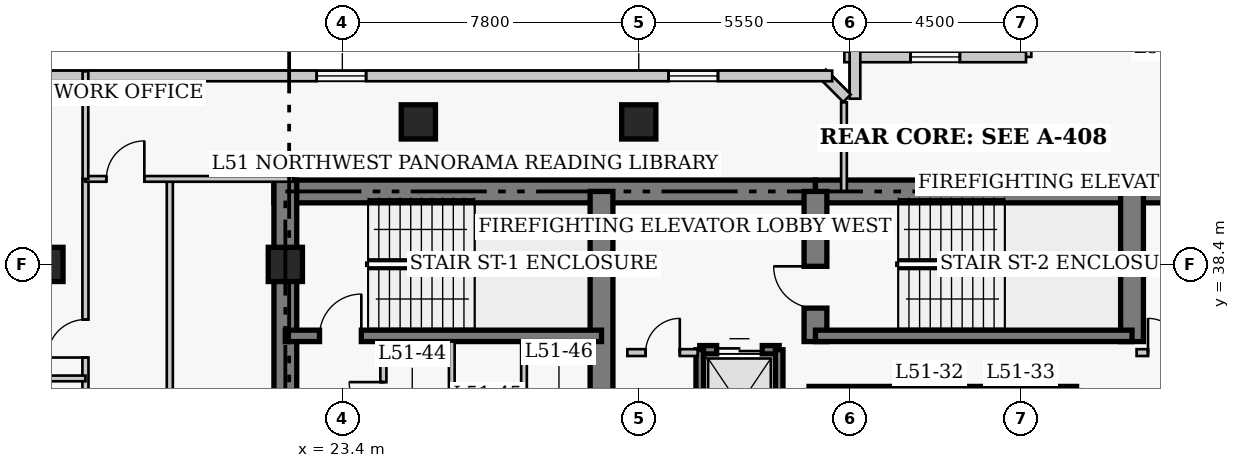
"""IFC4 building model, lengths in metres.
Left out: names, types, materials, properties, quantities, classifications, styles, units other than length and angle.
Written with IfcOpenShell. Run it as: python <this file> out.ifc"""

import sys

from ifc_helpers import new_model, si_unit, direction, frame, frame_2d, origin, origin_2d, place, context, subcontext, project, spatial, rectangle, extrude, element, fill, save


model = new_model("IFC4")
c1 = context("Model", 3, precision=1e-05, world=origin(), true_north=direction((0.0, 1.0)))
c2 = subcontext(c1, "Body", "Model", "MODEL_VIEW")
j1 = project(units=[si_unit("LENGTHUNIT", "METRE"), si_unit("PLANEANGLEUNIT", "RADIAN")], contexts=[c1])
p1 = place(None, origin())
s1 = spatial("IfcSite", under=j1, at=p1, CompositionType="ELEMENT")
p2 = place(p1, origin())
s2 = spatial("IfcBuilding", under=s1, at=p2, CompositionType="ELEMENT")
p3 = place(p2, frame((0.0, 0.0, 204.6)))
s3 = spatial("IfcBuildingStorey", under=s2, at=p3, CompositionType="ELEMENT", Elevation=204.6)
p4 = place(p3, frame((21.6, 40.32, 0.0), z_axis=(0.0, 0.0, 1.0), x_axis=(1.0, 0.0, 0.0)))
e1 = element("IfcWall", 1, at=p4, inside=s3, PredefinedType="SHEAR", context=c2, shape_type="SweptSolid", body=[
    extrude(rectangle(XDim=14.25, YDim=0.6, at=frame_2d((7.125, 0.0))), origin(), (0.0, 0.0, 1.0), 3.9),
])
p5 = place(p3, frame((35.85, 40.32, 0.0), z_axis=(0.0, 0.0, 1.0), x_axis=(1.0, 0.0, 0.0)))
e2 = element("IfcWall", 2, at=p5, inside=s3, PredefinedType="SHEAR", context=c2, shape_type="SweptSolid", body=[
    extrude(rectangle(XDim=12.6, YDim=0.6, at=frame_2d((6.3, 0.0))), origin(), (0.0, 0.0, 1.0), 3.9),
])
p6 = place(p3, frame((21.9, 27.05, 0.0), z_axis=(0.0, 0.0, 1.0), x_axis=(0.0, 1.0, 0.0)))
e3 = element("IfcWall", 3, at=p6, inside=s3, PredefinedType="SHEAR", context=c2, shape_type="SweptSolid", body=[
    extrude(rectangle(XDim=13.57, YDim=0.6, at=frame_2d((6.785, 0.0))), origin(), (0.0, 0.0, 1.0), 3.9),
])
p7 = place(p3, frame((30.22, 33.05, 0.0), z_axis=(0.0, 0.0, 1.0), x_axis=(0.0, 1.0, 0.0)))
e4 = element("IfcWall", 4, at=p7, inside=s3, PredefinedType="SHEAR", context=c2, shape_type="SweptSolid", body=[
    extrude(rectangle(XDim=7.27, YDim=0.6, at=frame_2d((3.635, 0.0))), origin(), (0.0, 0.0, 1.0), 3.9),
])
p8 = place(p3, frame((35.85, 36.37, 0.0), z_axis=(0.0, 0.0, 1.0), x_axis=(0.0, 1.0, 0.0)))
e5 = element("IfcWall", 5, at=p8, inside=s3, PredefinedType="SHEAR", context=c2, shape_type="SweptSolid", body=[
    extrude(rectangle(XDim=3.95, YDim=0.6, at=frame_2d((1.975, 0.0))), origin(), (0.0, 0.0, 1.0), 3.9),
])
p9 = place(p8, frame((0.88, 0.0, 0.0)))
e6 = element("IfcOpeningElement", 6, at=p9, cuts=e5, PredefinedType="OPENING", context=c2, shape_type="SweptSolid", body=[
    extrude(rectangle(XDim=1.1, YDim=2.15, at=frame_2d((0.55, 1.075))), frame((0.0, 0.31, 0.0), z_axis=(0.0, -1.0, 0.0), x_axis=(1.0, 0.0, 0.0)), (0.0, 0.0, 1.0), 0.62),
])
p10 = place(p3, frame((44.18, 36.37, 0.0), z_axis=(0.0, 0.0, 1.0), x_axis=(0.0, 1.0, 0.0)))
e7 = element("IfcWall", 7, at=p10, inside=s3, PredefinedType="SHEAR", context=c2, shape_type="SweptSolid", body=[
    extrude(rectangle(XDim=3.95, YDim=0.6, at=frame_2d((1.975, 0.0))), origin(), (0.0, 0.0, 1.0), 3.9),
])
p11 = place(p3, frame((21.9, 36.52, 0.0), z_axis=(0.0, 0.0, 1.0), x_axis=(1.0, 0.0, 0.0)))
e8 = element("IfcWall", 8, at=p11, inside=s3, PredefinedType="SHEAR", context=c2, shape_type="SweptSolid", body=[
    extrude(rectangle(XDim=8.32, YDim=0.3, at=frame_2d((4.16, 0.0))), origin(), (0.0, 0.0, 1.0), 3.9),
])
p12 = place(p11, frame((0.9, 0.0, 0.0)))
e9 = element("IfcOpeningElement", 9, at=p12, cuts=e8, PredefinedType="OPENING", context=c2, shape_type="SweptSolid", body=[
    extrude(rectangle(XDim=1.1, YDim=2.15, at=frame_2d((0.55, 1.075))), frame((0.0, 0.16, 0.0), z_axis=(0.0, -1.0, 0.0), x_axis=(1.0, 0.0, 0.0)), (0.0, 0.0, 1.0), 0.32),
])
p13 = place(p3, frame((35.85, 36.52, 0.0), z_axis=(0.0, 0.0, 1.0), x_axis=(1.0, 0.0, 0.0)))
e10 = element("IfcWall", 10, at=p13, inside=s3, PredefinedType="SHEAR", context=c2, shape_type="SweptSolid", body=[
    extrude(rectangle(XDim=8.33, YDim=0.3, at=frame_2d((4.165, 0.0))), origin(), (0.0, 0.0, 1.0), 3.9),
])
for number, where, z_axis, x_axis in (
    (11, (15.6, 38.4, 0.0), (0.0, 0.0, 1.0), (1.0, 0.0, 0.0)),
    (12, (21.9, 38.4, 0.0), (0.0, 0.0, 1.0), (1.0, 0.0, 0.0)),
    (13, (25.4, 42.15, 0.0), (0.0, 0.0, 1.0), (1.0, 0.0, 0.0)),
    (14, (31.2, 42.15, 0.0), (0.0, 0.0, 1.0), (1.0, 0.0, 0.0)),
):
    element("IfcColumn", number, at=place(p3, frame(where, z_axis=z_axis, x_axis=x_axis)), inside=s3, PredefinedType="COLUMN", context=c2, shape_type="SweptSolid", body=[
        extrude(rectangle(XDim=0.9, YDim=0.9, at=origin_2d()), origin(), (0.0, 0.0, 1.0), 3.9),
    ])
p14 = place(p3, frame((41.39, 47.44, 0.0), z_axis=(0.0, 0.0, 1.0), x_axis=(0.0, -1.0, 0.0)))
e15 = element("IfcWall", 15, at=p14, inside=s3, PredefinedType="SOLIDWALL", context=c2, shape_type="SweptSolid", body=[
    extrude(rectangle(XDim=3.58, YDim=0.28, at=frame_2d((1.79, 0.0))), origin(), (0.0, 0.0, 1.0), 3.65),
])
p15 = place(p14, frame((1.14, 0.0, 0.85)))
e16 = element("IfcOpeningElement", 16, at=p15, cuts=e15, PredefinedType="OPENING", context=c2, shape_type="SweptSolid", body=[
    extrude(rectangle(XDim=1.3, YDim=1.7, at=frame_2d((0.65, 0.85))), frame((0.0, 0.15, 0.0), z_axis=(0.0, -1.0, 0.0), x_axis=(1.0, 0.0, 0.0)), (0.0, 0.0, 1.0), 0.3),
])
p16 = place(p3, frame((41.39, 43.86, 0.0), z_axis=(0.0, 0.0, 1.0), x_axis=(-1.0, 0.0, 0.0)))
e17 = element("IfcWall", 17, at=p16, inside=s3, PredefinedType="SOLIDWALL", context=c2, shape_type="SweptSolid", body=[
    extrude(rectangle(XDim=4.78, YDim=0.28, at=frame_2d((2.39, 0.0))), origin(), (0.0, 0.0, 1.0), 3.65),
])
p17 = place(p16, frame((1.74, 0.0, 0.85)))
e18 = element("IfcOpeningElement", 18, at=p17, cuts=e17, PredefinedType="OPENING", context=c2, shape_type="SweptSolid", body=[
    extrude(rectangle(XDim=1.3, YDim=1.7, at=frame_2d((0.65, 0.85))), frame((0.0, 0.15, 0.0), z_axis=(0.0, -1.0, 0.0), x_axis=(1.0, 0.0, 0.0)), (0.0, 0.0, 1.0), 0.3),
])
p18 = place(p3, frame((36.89, 44.14, 0.0), z_axis=(0.0, 0.0, 1.0), x_axis=(0.0, -1.0, 0.0)))
e19 = element("IfcWall", 19, at=p18, inside=s3, PredefinedType="SOLIDWALL", context=c2, shape_type="SweptSolid", body=[
    extrude(rectangle(XDim=1.38, YDim=0.28, at=frame_2d((0.69, 0.0))), origin(), (0.0, 0.0, 1.0), 3.65),
])
p19 = place(p3, frame((36.679, 42.773, 0.0), z_axis=(0.0, 0.0, 1.0), x_axis=(-0.707106781187, 0.707106781187, 0.0)))
e20 = element("IfcWall", 20, at=p19, inside=s3, PredefinedType="SOLIDWALL", context=c2, shape_type="SweptSolid", body=[
    extrude(rectangle(XDim=0.928, YDim=0.28, at=frame_2d((0.464, 0.0))), origin(), (0.0, 0.0, 1.0), 3.65),
])
p20 = place(p3, frame((36.29, 43.36, 0.0), z_axis=(0.0, 0.0, 1.0), x_axis=(-1.0, 0.0, 0.0)))
e21 = element("IfcWall", 21, at=p20, inside=s3, PredefinedType="SOLIDWALL", context=c2, shape_type="SweptSolid", body=[
    extrude(rectangle(XDim=25.83, YDim=0.28, at=frame_2d((12.915, 0.0))), origin(), (0.0, 0.0, 1.0), 3.65),
])
p21 = place(p20, frame((3.005, 0.0, 0.85)))
e22 = element("IfcOpeningElement", 22, at=p21, cuts=e21, PredefinedType="OPENING", context=c2, shape_type="SweptSolid", body=[
    extrude(rectangle(XDim=1.3, YDim=1.7, at=frame_2d((0.65, 0.85))), frame((0.0, 0.15, 0.0), z_axis=(0.0, -1.0, 0.0), x_axis=(1.0, 0.0, 0.0)), (0.0, 0.0, 1.0), 0.3),
])
p22 = place(p20, frame((12.265, 0.0, 0.85)))
e23 = element("IfcOpeningElement", 23, at=p22, cuts=e21, PredefinedType="OPENING", context=c2, shape_type="SweptSolid", body=[
    extrude(rectangle(XDim=1.3, YDim=1.7, at=frame_2d((0.65, 0.85))), frame((0.0, 0.15, 0.0), z_axis=(0.0, -1.0, 0.0), x_axis=(1.0, 0.0, 0.0)), (0.0, 0.0, 1.0), 0.3),
])
p23 = place(p20, frame((20.875, 0.0, 0.85)))
e24 = element("IfcOpeningElement", 24, at=p23, cuts=e21, PredefinedType="OPENING", context=c2, shape_type="SweptSolid", body=[
    extrude(rectangle(XDim=1.3, YDim=1.7, at=frame_2d((0.65, 0.85))), frame((0.0, 0.15, 0.0), z_axis=(0.0, -1.0, 0.0), x_axis=(1.0, 0.0, 0.0)), (0.0, 0.0, 1.0), 0.3),
])
p24 = place(p3, frame((35.68, 35.08, 0.0), z_axis=(0.0, 0.0, 1.0), x_axis=(1.0, 0.0, 0.0)))
e25 = element("IfcWall", 25, at=p24, inside=s3, PredefinedType="SHEAR", context=c2, shape_type="SweptSolid", body=[
    extrude(rectangle(XDim=2.32, YDim=0.22, at=frame_2d((1.16, 0.0))), origin(), (0.0, 0.0, 1.0), 3.9),
])
p25 = place(p3, frame((38.0, 35.08, 0.0), z_axis=(0.0, 0.0, 1.0), x_axis=(1.0, 0.0, 0.0)))
e26 = element("IfcWall", 26, at=p25, inside=s3, PredefinedType="SHEAR", context=c2, shape_type="SweptSolid", body=[
    extrude(rectangle(XDim=2.4, YDim=0.22, at=frame_2d((1.2, 0.0))), origin(), (0.0, 0.0, 1.0), 3.9),
])
p26 = place(p3, frame((40.4, 35.08, 0.0), z_axis=(0.0, 0.0, 1.0), x_axis=(1.0, 0.0, 0.0)))
e27 = element("IfcWall", 27, at=p26, inside=s3, PredefinedType="SHEAR", context=c2, shape_type="SweptSolid", body=[
    extrude(rectangle(XDim=2.32, YDim=0.22, at=frame_2d((1.16, 0.0))), origin(), (0.0, 0.0, 1.0), 3.9),
])
p27 = place(p3, frame((32.805, 36.155, 0.0), z_axis=(0.0, 0.0, 1.0), x_axis=(1.0, 0.0, 0.0)))
e28 = element("IfcWall", 28, at=p27, inside=s3, PredefinedType="SHEAR", context=c2, shape_type="SweptSolid", body=[
    extrude(rectangle(XDim=2.09, YDim=0.22, at=frame_2d((1.045, 0.0))), origin(), (0.0, 0.0, 1.0), 3.9),
])
p28 = place(p27, frame((0.445, 0.0, 0.0)))
e29 = element("IfcOpeningElement", 29, at=p28, cuts=e28, PredefinedType="OPENING", context=c2, shape_type="SweptSolid", body=[
    extrude(rectangle(XDim=1.2, YDim=2.15, at=frame_2d((0.6, 1.075))), frame((0.0, 0.12, 0.0), z_axis=(0.0, -1.0, 0.0), x_axis=(1.0, 0.0, 0.0)), (0.0, 0.0, 1.0), 0.24),
])
for number, where, z_axis, x_axis in (
    (30, (32.805, 33.245, 0.0), (0.0, 0.0, 1.0), (0.0, 1.0, 0.0)),
    (31, (34.895, 33.245, 0.0), (0.0, 0.0, 1.0), (0.0, 1.0, 0.0)),
):
    element("IfcWall", number, at=place(p3, frame(where, z_axis=z_axis, x_axis=x_axis)), inside=s3, PredefinedType="SHEAR", context=c2, shape_type="SweptSolid", body=[
        extrude(rectangle(XDim=2.91, YDim=0.2, at=frame_2d((1.455, 0.0))), origin(), (0.0, 0.0, 1.0), 3.9),
    ])
p29 = place(p3, frame((30.9, 36.08, 0.0), z_axis=(0.0, 0.0, 1.0), x_axis=(1.0, 0.0, 0.0)))
e32 = element("IfcWall", 32, at=p29, inside=s3, PredefinedType="PARTITIONING", context=c2, shape_type="SweptSolid", body=[
    extrude(rectangle(XDim=1.85, YDim=0.18, at=frame_2d((0.925, 0.0))), origin(), (0.0, 0.0, 1.0), 3.65),
])
p30 = place(p29, frame((0.48, 0.0, 0.0)))
e33 = element("IfcOpeningElement", 33, at=p30, cuts=e32, PredefinedType="OPENING", context=c2, shape_type="SweptSolid", body=[
    extrude(rectangle(XDim=0.9, YDim=2.15, at=frame_2d((0.45, 1.075))), frame((0.0, 0.1, 0.0), z_axis=(0.0, -1.0, 0.0), x_axis=(1.0, 0.0, 0.0)), (0.0, 0.0, 1.0), 0.2),
])
p31 = place(p3, frame((44.3, 36.08, 0.0), z_axis=(0.0, 0.0, 1.0), x_axis=(1.0, 0.0, 0.0)))
e34 = element("IfcWall", 34, at=p31, inside=s3, PredefinedType="PARTITIONING", context=c2, shape_type="SweptSolid", body=[
    extrude(rectangle(XDim=1.5, YDim=0.18, at=frame_2d((0.75, 0.0))), origin(), (0.0, 0.0, 1.0), 3.65),
])
p32 = place(p31, frame((0.3, 0.0, 0.0)))
e35 = element("IfcOpeningElement", 35, at=p32, cuts=e34, PredefinedType="OPENING", context=c2, shape_type="SweptSolid", body=[
    extrude(rectangle(XDim=0.9, YDim=2.15, at=frame_2d((0.45, 1.075))), frame((0.0, 0.1, 0.0), z_axis=(0.0, -1.0, 0.0), x_axis=(1.0, 0.0, 0.0)), (0.0, 0.0, 1.0), 0.2),
])
p33 = place(p3, frame((24.48, 32.8, 0.0), z_axis=(0.0, 0.0, 1.0), x_axis=(0.0, 1.0, 0.0)))
e36 = element("IfcWall", 36, at=p33, inside=s3, PredefinedType="PARTITIONING", context=c2, shape_type="SweptSolid", body=[
    extrude(rectangle(XDim=3.57, YDim=0.16, at=frame_2d((1.785, 0.0))), origin(), (0.0, 0.0, 1.0), 3.65),
])
p34 = place(p33, frame((1.604, 0.0, 0.0)))
e37 = element("IfcOpeningElement", 37, at=p34, cuts=e36, PredefinedType="OPENING", context=c2, shape_type="SweptSolid", body=[
    extrude(rectangle(XDim=0.9, YDim=2.1, at=frame_2d((0.45, 1.05))), frame((0.0, 0.09, 0.0), z_axis=(0.0, -1.0, 0.0), x_axis=(1.0, 0.0, 0.0)), (0.0, 0.0, 1.0), 0.18),
])
for number, where, z_axis, x_axis in (
    (38, (26.28, 32.75, 0.0), (0.0, 0.0, 1.0), (0.0, 1.0, 0.0)),
    (39, (28.18, 32.75, 0.0), (0.0, 0.0, 1.0), (0.0, 1.0, 0.0)),
):
    element("IfcWall", number, at=place(p3, frame(where, z_axis=z_axis, x_axis=x_axis)), inside=s3, PredefinedType="PARTITIONING", context=c2, shape_type="SweptSolid", body=[
        extrude(rectangle(XDim=3.62, YDim=0.15, at=frame_2d((1.81, 0.0))), origin(), (0.0, 0.0, 1.0), 3.65),
    ])
p35 = place(p3, frame((16.64, 7.55, 0.0), z_axis=(0.0, 0.0, 1.0), x_axis=(0.0, 1.0, 0.0)))
e40 = element("IfcWall", 40, at=p35, inside=s3, PredefinedType="PARTITIONING", context=c2, shape_type="SweptSolid", body=[
    extrude(rectangle(XDim=33.1, YDim=0.16, at=frame_2d((16.55, 0.0))), origin(), (0.0, 0.0, 1.0), 3.65),
])
p36 = place(p35, frame((0.46, 0.0, 0.0)))
e41 = element("IfcOpeningElement", 41, at=p36, cuts=e40, PredefinedType="OPENING", context=c2, shape_type="SweptSolid", body=[
    extrude(rectangle(XDim=0.95, YDim=2.1, at=frame_2d((0.475, 1.05))), frame((0.0, 0.09, 0.0), z_axis=(0.0, -1.0, 0.0), x_axis=(1.0, 0.0, 0.0)), (0.0, 0.0, 1.0), 0.18),
])
p37 = place(p35, frame((7.575, 0.0, 0.0)))
e42 = element("IfcOpeningElement", 42, at=p37, cuts=e40, PredefinedType="OPENING", context=c2, shape_type="SweptSolid", body=[
    extrude(rectangle(XDim=0.95, YDim=2.1, at=frame_2d((0.475, 1.05))), frame((0.0, 0.09, 0.0), z_axis=(0.0, -1.0, 0.0), x_axis=(1.0, 0.0, 0.0)), (0.0, 0.0, 1.0), 0.18),
])
p38 = place(p35, frame((14.178, 0.0, 0.0)))
e43 = element("IfcOpeningElement", 43, at=p38, cuts=e40, PredefinedType="OPENING", context=c2, shape_type="SweptSolid", body=[
    extrude(rectangle(XDim=0.95, YDim=2.1, at=frame_2d((0.475, 1.05))), frame((0.0, 0.09, 0.0), z_axis=(0.0, -1.0, 0.0), x_axis=(1.0, 0.0, 0.0)), (0.0, 0.0, 1.0), 0.18),
])
p39 = place(p35, frame((28.4, 0.0, 0.0)))
e44 = element("IfcOpeningElement", 44, at=p39, cuts=e40, PredefinedType="OPENING", context=c2, shape_type="SweptSolid", body=[
    extrude(rectangle(XDim=1.0, YDim=2.15, at=frame_2d((0.5, 1.075))), frame((0.0, 0.09, 0.0), z_axis=(0.0, -1.0, 0.0), x_axis=(1.0, 0.0, 0.0)), (0.0, 0.0, 1.0), 0.18),
])
p40 = place(p3, frame((18.86, 35.02, 0.0), z_axis=(0.0, 0.0, 1.0), x_axis=(0.0, 1.0, 0.0)))
e45 = element("IfcWall", 45, at=p40, inside=s3, PredefinedType="PARTITIONING", context=c2, shape_type="SweptSolid", body=[
    extrude(rectangle(XDim=5.63, YDim=0.16, at=frame_2d((2.815, 0.0))), origin(), (0.0, 0.0, 1.0), 3.65),
])
p41 = place(p3, frame((16.64, 40.65, 0.0), z_axis=(0.0, 0.0, 1.0), x_axis=(1.0, 0.0, 0.0)))
e46 = element("IfcWall", 46, at=p41, inside=s3, PredefinedType="PARTITIONING", context=c2, shape_type="SweptSolid", body=[
    extrude(rectangle(XDim=5.46, YDim=0.15, at=frame_2d((2.73, 0.0))), origin(), (0.0, 0.0, 1.0), 3.65),
])
p42 = place(p41, frame((0.55, 0.0, 0.0)))
e47 = element("IfcOpeningElement", 47, at=p42, cuts=e46, PredefinedType="OPENING", context=c2, shape_type="SweptSolid", body=[
    extrude(rectangle(XDim=1.0, YDim=2.15, at=frame_2d((0.5, 1.075))), frame((0.0, 0.085, 0.0), z_axis=(0.0, -1.0, 0.0), x_axis=(1.0, 0.0, 0.0)), (0.0, 0.0, 1.0), 0.17),
])
p43 = place(p3, frame((16.64, 40.65, 0.0), z_axis=(0.0, 0.0, 1.0), x_axis=(0.0, 1.0, 0.0)))
e48 = element("IfcWall", 48, at=p43, inside=s3, PredefinedType="PARTITIONING", context=c2, shape_type="SweptSolid", body=[
    extrude(rectangle(XDim=2.83, YDim=0.15, at=frame_2d((1.415, 0.0))), origin(), (0.0, 0.0, 1.0), 3.65),
])
p44 = place(p3, frame((36.6, 40.32, 0.0), z_axis=(0.0, 0.0, 1.0), x_axis=(0.0, 1.0, 0.0)))
e49 = element("IfcWall", 49, at=p44, inside=s3, PredefinedType="PARTITIONING", context=c2, shape_type="SweptSolid", body=[
    extrude(rectangle(XDim=2.345, YDim=0.15, at=frame_2d((1.172, 0.0))), origin(), (0.0, 0.0, 1.0), 3.65),
])
p45 = place(p3, frame((14.45, 35.4, 0.0), z_axis=(0.0, 0.0, 1.0), x_axis=(1.0, 0.0, 0.0)))
e50 = element("IfcWall", 50, at=p45, inside=s3, PredefinedType="PARTITIONING", context=c2, shape_type="SweptSolid", body=[
    extrude(rectangle(XDim=2.19, YDim=0.15, at=frame_2d((1.095, 0.0))), origin(), (0.0, 0.0, 1.0), 3.65),
])
p46 = place(p17, origin())
e51 = element("IfcWindow", 51, at=p46, inside=s3, PartitioningType="SINGLE_PANEL", PredefinedType="WINDOW", context=c2, shape_type="SweptSolid", body=[
    extrude(rectangle(XDim=1.3, YDim=1.7, at=frame_2d((0.65, 0.85))), frame((0.0, 0.03, 0.0), z_axis=(0.0, -1.0, 0.0), x_axis=(1.0, 0.0, 0.0)), (0.0, 0.0, 1.0), 0.06),
])
fill(e18, e51)
p47 = place(p21, origin())
e52 = element("IfcWindow", 52, at=p47, inside=s3, PartitioningType="SINGLE_PANEL", PredefinedType="WINDOW", context=c2, shape_type="SweptSolid", body=[
    extrude(rectangle(XDim=1.3, YDim=1.7, at=frame_2d((0.65, 0.85))), frame((0.0, 0.03, 0.0), z_axis=(0.0, -1.0, 0.0), x_axis=(1.0, 0.0, 0.0)), (0.0, 0.0, 1.0), 0.06),
])
fill(e22, e52)
p48 = place(p22, origin())
e53 = element("IfcWindow", 53, at=p48, inside=s3, PartitioningType="SINGLE_PANEL", PredefinedType="WINDOW", context=c2, shape_type="SweptSolid", body=[
    extrude(rectangle(XDim=1.3, YDim=1.7, at=frame_2d((0.65, 0.85))), frame((0.0, 0.03, 0.0), z_axis=(0.0, -1.0, 0.0), x_axis=(1.0, 0.0, 0.0)), (0.0, 0.0, 1.0), 0.06),
])
fill(e23, e53)
p49 = place(p28, origin())
e54 = element("IfcDoor", 54, at=p49, inside=s3, OperationType="DOUBLE_DOOR_SLIDING", PredefinedType="DOOR", context=c2, shape_type="SweptSolid", body=[
    extrude(rectangle(XDim=1.2, YDim=2.15, at=frame_2d((0.6, 1.075))), frame((0.0, 0.025, 0.0), z_axis=(0.0, -1.0, 0.0), x_axis=(1.0, 0.0, 0.0)), (0.0, 0.0, 1.0), 0.05),
])
fill(e29, e54)
p50 = place(p30, origin())
e55 = element("IfcDoor", 55, at=p50, inside=s3, OperationType="SINGLE_SWING_RIGHT", PredefinedType="DOOR", context=c2, shape_type="SweptSolid", body=[
    extrude(rectangle(XDim=0.9, YDim=2.15, at=frame_2d((0.45, 1.075))), frame((0.0, 0.025, 0.0), z_axis=(0.0, -1.0, 0.0), x_axis=(1.0, 0.0, 0.0)), (0.0, 0.0, 1.0), 0.05),
])
fill(e33, e55)
p51 = place(p32, origin())
e56 = element("IfcDoor", 56, at=p51, inside=s3, OperationType="SINGLE_SWING_LEFT", PredefinedType="DOOR", context=c2, shape_type="SweptSolid", body=[
    extrude(rectangle(XDim=0.9, YDim=2.15, at=frame_2d((0.45, 1.075))), frame((0.0, 0.025, 0.0), z_axis=(0.0, -1.0, 0.0), x_axis=(1.0, 0.0, 0.0)), (0.0, 0.0, 1.0), 0.05),
])
fill(e35, e56)
p52 = place(p34, origin())
e57 = element("IfcDoor", 57, at=p52, inside=s3, OperationType="SINGLE_SWING_RIGHT", PredefinedType="DOOR", context=c2, shape_type="SweptSolid", body=[
    extrude(rectangle(XDim=0.9, YDim=2.1, at=frame_2d((0.45, 1.05))), frame((0.0, 0.025, 0.0), z_axis=(0.0, -1.0, 0.0), x_axis=(1.0, 0.0, 0.0)), (0.0, 0.0, 1.0), 0.05),
])
fill(e37, e57)
p53 = place(p42, origin())
e58 = element("IfcDoor", 58, at=p53, inside=s3, OperationType="SINGLE_SWING_RIGHT", PredefinedType="DOOR", context=c2, shape_type="SweptSolid", body=[
    extrude(rectangle(XDim=1.0, YDim=2.15, at=frame_2d((0.5, 1.075))), frame((0.0, 0.025, 0.0), z_axis=(0.0, -1.0, 0.0), x_axis=(1.0, 0.0, 0.0)), (0.0, 0.0, 1.0), 0.05),
])
fill(e47, e58)
p54 = place(p39, origin())
e59 = element("IfcDoor", 59, at=p54, inside=s3, OperationType="SINGLE_SWING_LEFT", PredefinedType="DOOR", context=c2, shape_type="SweptSolid", body=[
    extrude(rectangle(XDim=1.0, YDim=2.15, at=frame_2d((0.5, 1.075))), frame((0.0, 0.025, 0.0), z_axis=(0.0, -1.0, 0.0), x_axis=(1.0, 0.0, 0.0)), (0.0, 0.0, 1.0), 0.05),
])
fill(e44, e59)
p55 = place(p12, origin())
e60 = element("IfcDoor", 60, at=p55, inside=s3, OperationType="SINGLE_SWING_RIGHT", PredefinedType="DOOR", context=c2, shape_type="SweptSolid", body=[
    extrude(rectangle(XDim=1.1, YDim=2.15, at=frame_2d((0.55, 1.075))), frame((0.0, 0.025, 0.0), z_axis=(0.0, -1.0, 0.0), x_axis=(1.0, 0.0, 0.0)), (0.0, 0.0, 1.0), 0.05),
])
fill(e9, e60)
p56 = place(p9, origin())
e61 = element("IfcDoor", 61, at=p56, inside=s3, OperationType="SINGLE_SWING_RIGHT", PredefinedType="DOOR", context=c2, shape_type="SweptSolid", body=[
    extrude(rectangle(XDim=1.1, YDim=2.15, at=frame_2d((0.55, 1.075))), frame((0.0, 0.025, 0.0), z_axis=(0.0, -1.0, 0.0), x_axis=(1.0, 0.0, 0.0)), (0.0, 0.0, 1.0), 0.05),
])
fill(e6, e61)
save(model, sys.argv[1])
